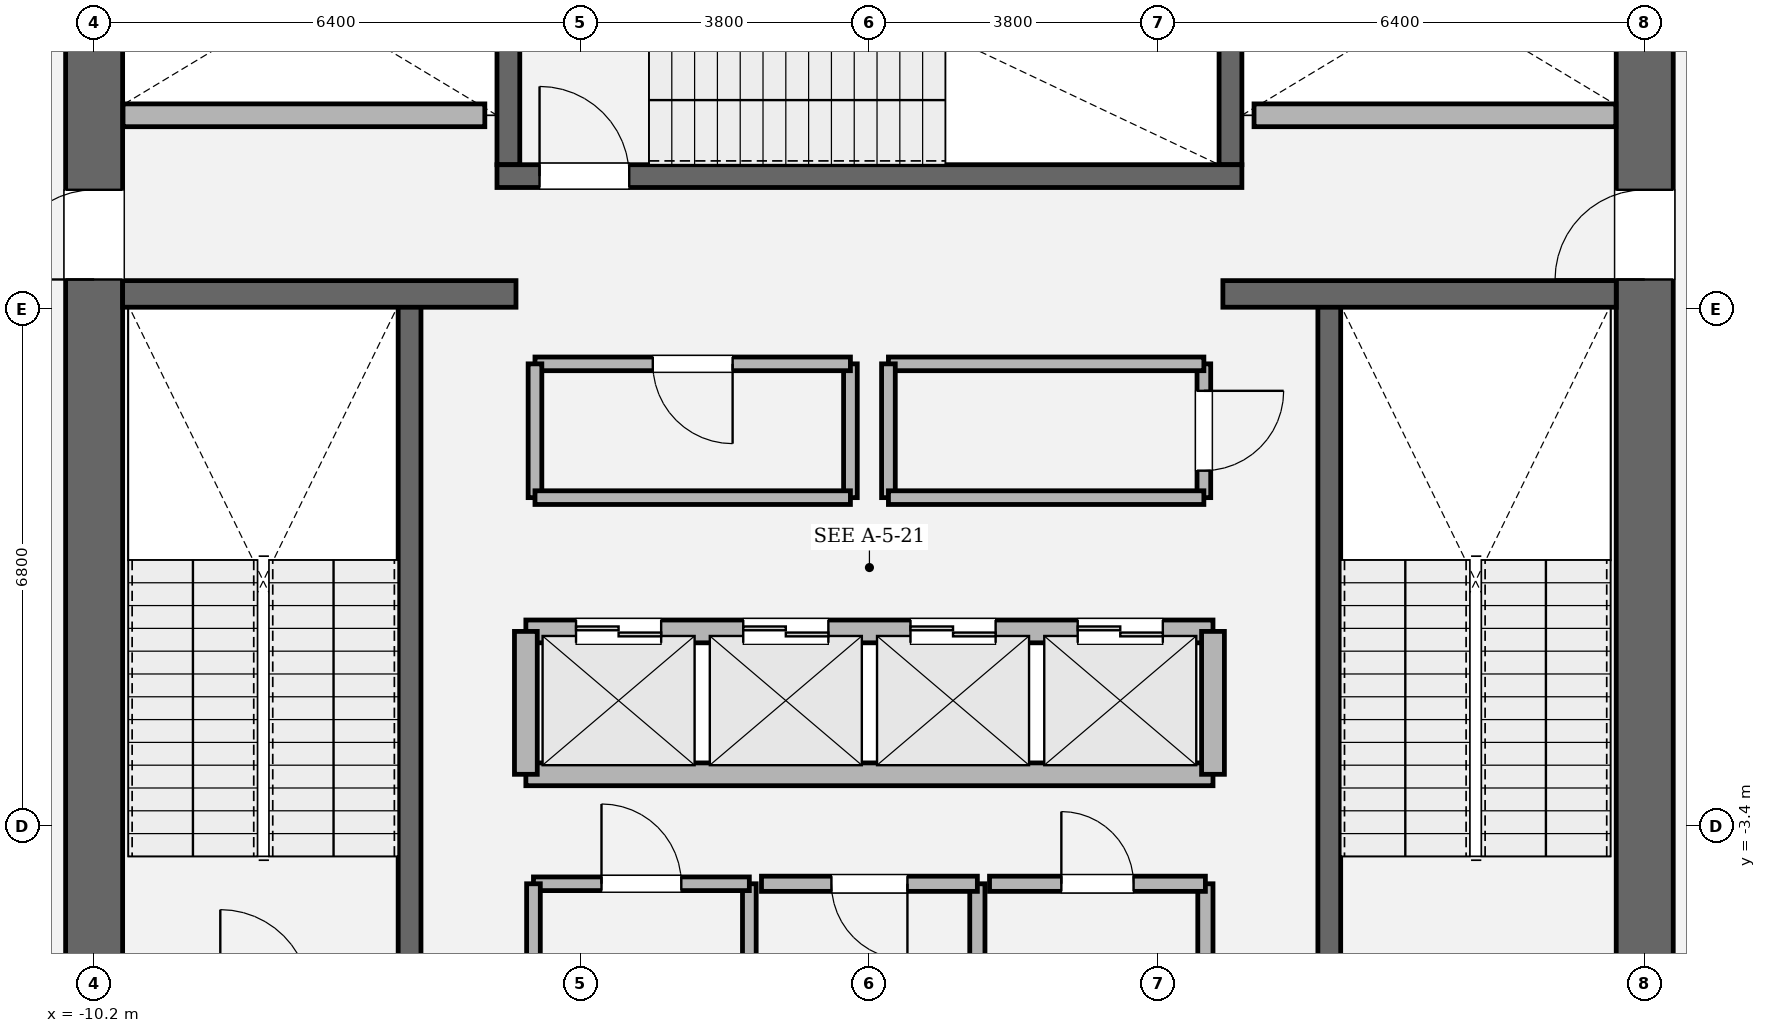
"""IFC4 building model, lengths in metres.
Left out: names, types, materials, properties, quantities, classifications, styles, units other than length and angle.
Written with IfcOpenShell. Run it as: python <this file> out.ifc"""

import sys

from ifc_helpers import new_model, si_unit, direction, frame, frame_2d, origin, place, context, subcontext, project, spatial, rectangle, extrude, element, fill, save


model = new_model("IFC4")
c1 = context("Model", 3, precision=1e-05, world=origin(), true_north=direction((0.0, 1.0)))
c2 = subcontext(c1, "Body", "Model", "MODEL_VIEW")
j1 = project(units=[si_unit("LENGTHUNIT", "METRE"), si_unit("PLANEANGLEUNIT", "RADIAN")], contexts=[c1])
p1 = place(None, origin())
s1 = spatial("IfcSite", under=j1, at=p1, CompositionType="ELEMENT")
p2 = place(p1, origin())
s2 = spatial("IfcBuilding", under=s1, at=p2, CompositionType="ELEMENT")
p3 = place(p2, frame((0.0, 0.0, 105.15)))
s3 = spatial("IfcBuildingStorey", under=s2, at=p3, CompositionType="ELEMENT", Elevation=105.15)
p4 = place(p3, frame((-10.2, -8.825, 0.0), z_axis=(0.0, 0.0, 1.0), x_axis=(0.0, 1.0, 0.0)))
e1 = element("IfcWall", 1, at=p4, inside=s3, PredefinedType="SHEAR", context=c2, shape_type="SweptSolid", body=[
    extrude(rectangle(XDim=17.65, YDim=0.75, at=frame_2d((8.825, 0.0))), origin(), (0.0, 0.0, 1.0), 4.05),
])
p5 = place(p4, frame((12.615, 0.0, 0.0)))
e2 = element("IfcOpeningElement", 2, at=p5, cuts=e1, PredefinedType="OPENING", context=c2, shape_type="SweptSolid", body=[
    extrude(rectangle(XDim=1.18, YDim=2.2, at=frame_2d((0.59, 1.1))), frame((0.0, 0.385, 0.0), z_axis=(0.0, -1.0, 0.0), x_axis=(1.0, 0.0, 0.0)), (0.0, 0.0, 1.0), 0.77),
])
p6 = place(p3, frame((10.2, 8.825, 0.0), z_axis=(0.0, 0.0, 1.0), x_axis=(0.0, -1.0, 0.0)))
e3 = element("IfcWall", 3, at=p6, inside=s3, PredefinedType="SHEAR", context=c2, shape_type="SweptSolid", body=[
    extrude(rectangle(XDim=17.65, YDim=0.75, at=frame_2d((8.825, 0.0))), origin(), (0.0, 0.0, 1.0), 4.05),
])
p7 = place(p6, frame((3.855, 0.0, 0.0)))
e4 = element("IfcOpeningElement", 4, at=p7, cuts=e3, PredefinedType="OPENING", context=c2, shape_type="SweptSolid", body=[
    extrude(rectangle(XDim=1.18, YDim=2.2, at=frame_2d((0.59, 1.1))), frame((0.0, 0.385, 0.0), z_axis=(0.0, -1.0, 0.0), x_axis=(1.0, 0.0, 0.0)), (0.0, 0.0, 1.0), 0.77),
])
for number, where, z_axis, x_axis in (
    (5, (-6.05, -5.5, 0.0), (0.0, 0.0, 1.0), (0.0, 1.0, 0.0)),
    (6, (6.05, 3.45, 0.0), (0.0, 0.0, 1.0), (0.0, -1.0, 0.0)),
):
    element("IfcWall", number, at=place(p3, frame(where, z_axis=z_axis, x_axis=x_axis)), inside=s3, PredefinedType="SOLIDWALL", context=c2, shape_type="SweptSolid", body=[
        extrude(rectangle(XDim=8.95, YDim=0.3, at=frame_2d((4.475, 0.0))), origin(), (0.0, 0.0, 1.0), 4.05),
    ])
for number, where, z_axis, x_axis in (
    (7, (-4.75, 5.3, 0.0), (0.0, 0.0, 1.0), (0.0, 1.0, 0.0)),
    (8, (4.75, 8.825, 0.0), (0.0, 0.0, 1.0), (0.0, -1.0, 0.0)),
):
    element("IfcWall", number, at=place(p3, frame(where, z_axis=z_axis, x_axis=x_axis)), inside=s3, PredefinedType="SOLIDWALL", context=c2, shape_type="SweptSolid", body=[
        extrude(rectangle(XDim=3.525, YDim=0.3, at=frame_2d((1.762, 0.0))), origin(), (0.0, 0.0, 1.0), 4.05),
    ])
p8 = place(p3, frame((-4.9, 5.15, 0.0), z_axis=(0.0, 0.0, 1.0), x_axis=(1.0, 0.0, 0.0)))
e9 = element("IfcWall", 9, at=p8, inside=s3, PredefinedType="SOLIDWALL", context=c2, shape_type="SweptSolid", body=[
    extrude(rectangle(XDim=9.8, YDim=0.3, at=frame_2d((4.9, 0.0))), origin(), (0.0, 0.0, 1.0), 4.05),
])
p9 = place(p8, frame((0.56, 0.0, 0.0)))
e10 = element("IfcOpeningElement", 10, at=p9, cuts=e9, PredefinedType="OPENING", context=c2, shape_type="SweptSolid", body=[
    extrude(rectangle(XDim=1.18, YDim=2.2, at=frame_2d((0.59, 1.1))), frame((0.0, 0.16, 0.0), z_axis=(0.0, -1.0, 0.0), x_axis=(1.0, 0.0, 0.0)), (0.0, 0.0, 1.0), 0.32),
])
for number, where, z_axis, x_axis in (
    (11, (-9.825, 3.6, 0.0), (0.0, 0.0, 1.0), (1.0, 0.0, 0.0)),
    (12, (4.65, 3.6, 0.0), (0.0, 0.0, 1.0), (1.0, 0.0, 0.0)),
):
    element("IfcWall", number, at=place(p3, frame(where, z_axis=z_axis, x_axis=x_axis)), inside=s3, PredefinedType="SOLIDWALL", context=c2, shape_type="SweptSolid", body=[
        extrude(rectangle(XDim=5.175, YDim=0.35, at=frame_2d((2.587, 0.0))), origin(), (0.0, 0.0, 1.0), 4.05),
    ])
p10 = place(p3, frame((-4.52, -0.84, 0.0), z_axis=(0.0, 0.0, 1.0), x_axis=(1.0, 0.0, 0.0)))
e13 = element("IfcWall", 13, at=p10, inside=s3, PredefinedType="SOLIDWALL", context=c2, shape_type="SweptSolid", body=[
    extrude(rectangle(XDim=9.04, YDim=0.3, at=frame_2d((4.52, 0.0))), origin(), (0.0, 0.0, 1.0), 3.81),
])
p11 = place(p10, frame((0.66, 0.0, 0.0)))
e14 = element("IfcOpeningElement", 14, at=p11, cuts=e13, PredefinedType="OPENING", context=c2, shape_type="SweptSolid", body=[
    extrude(rectangle(XDim=1.12, YDim=2.25, at=frame_2d((0.56, 1.125))), frame((0.0, 0.16, 0.0), z_axis=(0.0, -1.0, 0.0), x_axis=(1.0, 0.0, 0.0)), (0.0, 0.0, 1.0), 0.32),
])
p12 = place(p10, frame((2.86, 0.0, 0.0)))
e15 = element("IfcOpeningElement", 15, at=p12, cuts=e13, PredefinedType="OPENING", context=c2, shape_type="SweptSolid", body=[
    extrude(rectangle(XDim=1.12, YDim=2.25, at=frame_2d((0.56, 1.125))), frame((0.0, 0.16, 0.0), z_axis=(0.0, -1.0, 0.0), x_axis=(1.0, 0.0, 0.0)), (0.0, 0.0, 1.0), 0.32),
])
p13 = place(p10, frame((5.06, 0.0, 0.0)))
e16 = element("IfcOpeningElement", 16, at=p13, cuts=e13, PredefinedType="OPENING", context=c2, shape_type="SweptSolid", body=[
    extrude(rectangle(XDim=1.12, YDim=2.25, at=frame_2d((0.56, 1.125))), frame((0.0, 0.16, 0.0), z_axis=(0.0, -1.0, 0.0), x_axis=(1.0, 0.0, 0.0)), (0.0, 0.0, 1.0), 0.32),
])
p14 = place(p10, frame((7.26, 0.0, 0.0)))
e17 = element("IfcOpeningElement", 17, at=p14, cuts=e13, PredefinedType="OPENING", context=c2, shape_type="SweptSolid", body=[
    extrude(rectangle(XDim=1.12, YDim=2.25, at=frame_2d((0.56, 1.125))), frame((0.0, 0.16, 0.0), z_axis=(0.0, -1.0, 0.0), x_axis=(1.0, 0.0, 0.0)), (0.0, 0.0, 1.0), 0.32),
])
p15 = place(p3, frame((-4.52, -2.72, 0.0), z_axis=(0.0, 0.0, 1.0), x_axis=(1.0, 0.0, 0.0)))
e18 = element("IfcWall", 18, at=p15, inside=s3, PredefinedType="SOLIDWALL", context=c2, shape_type="SweptSolid", body=[
    extrude(rectangle(XDim=9.04, YDim=0.3, at=frame_2d((4.52, 0.0))), origin(), (0.0, 0.0, 1.0), 3.81),
])
for number, where, z_axis, x_axis in (
    (19, (-4.52, -2.72, 0.0), (0.0, 0.0, 1.0), (0.0, 1.0, 0.0)),
    (20, (4.52, -2.72, 0.0), (0.0, 0.0, 1.0), (0.0, 1.0, 0.0)),
):
    element("IfcWall", number, at=place(p3, frame(where, z_axis=z_axis, x_axis=x_axis)), inside=s3, PredefinedType="SOLIDWALL", context=c2, shape_type="SweptSolid", body=[
        extrude(rectangle(XDim=1.88, YDim=0.3, at=frame_2d((0.94, 0.0))), origin(), (0.0, 0.0, 1.0), 3.81),
    ])
for number, where, z_axis, x_axis in (
    (21, (-9.82, 5.95, 0.0), (0.0, 0.0, 1.0), (1.0, 0.0, 0.0)),
    (22, (5.06, 5.95, 0.0), (0.0, 0.0, 1.0), (1.0, 0.0, 0.0)),
):
    element("IfcWall", number, at=place(p3, frame(where, z_axis=z_axis, x_axis=x_axis)), inside=s3, PredefinedType="SOLIDWALL", context=c2, shape_type="SweptSolid", body=[
        extrude(rectangle(XDim=4.76, YDim=0.3, at=frame_2d((2.38, 0.0))), origin(), (0.0, 0.0, 1.0), 3.81),
    ])
p16 = place(p3, frame((-1.58, -5.9, 0.0), z_axis=(0.0, 0.0, 1.0), x_axis=(0.0, 1.0, 0.0)))
e23 = element("IfcWall", 23, at=p16, inside=s3, PredefinedType="PARTITIONING", context=c2, shape_type="SweptSolid", body=[
    extrude(rectangle(XDim=1.74, YDim=0.18, at=frame_2d((0.87, 0.0))), origin(), (0.0, 0.0, 1.0), 3.81),
])
p17 = place(p3, frame((-1.58, -4.16, 0.0), z_axis=(0.0, 0.0, 1.0), x_axis=(-1.0, 0.0, 0.0)))
e24 = element("IfcWall", 24, at=p17, inside=s3, PredefinedType="PARTITIONING", context=c2, shape_type="SweptSolid", body=[
    extrude(rectangle(XDim=2.84, YDim=0.18, at=frame_2d((1.42, 0.0))), origin(), (0.0, 0.0, 1.0), 3.81),
])
p18 = place(p17, frame((0.895, 0.0, 0.0)))
e25 = element("IfcOpeningElement", 25, at=p18, cuts=e24, PredefinedType="OPENING", context=c2, shape_type="SweptSolid", body=[
    extrude(rectangle(XDim=1.05, YDim=2.2, at=frame_2d((0.525, 1.1))), frame((0.0, 0.1, 0.0), z_axis=(0.0, -1.0, 0.0), x_axis=(1.0, 0.0, 0.0)), (0.0, 0.0, 1.0), 0.2),
])
p19 = place(p3, frame((-4.42, -4.16, 0.0), z_axis=(0.0, 0.0, 1.0), x_axis=(0.0, -1.0, 0.0)))
e26 = element("IfcWall", 26, at=p19, inside=s3, PredefinedType="PARTITIONING", context=c2, shape_type="SweptSolid", body=[
    extrude(rectangle(XDim=1.74, YDim=0.18, at=frame_2d((0.87, 0.0))), origin(), (0.0, 0.0, 1.0), 3.81),
])
p20 = place(p3, frame((1.42, -5.9, 0.0), z_axis=(0.0, 0.0, 1.0), x_axis=(0.0, 1.0, 0.0)))
e27 = element("IfcWall", 27, at=p20, inside=s3, PredefinedType="SOLIDWALL", context=c2, shape_type="SweptSolid", body=[
    extrude(rectangle(XDim=1.74, YDim=0.2, at=frame_2d((0.87, 0.0))), origin(), (0.0, 0.0, 1.0), 3.81),
])
p21 = place(p3, frame((1.42, -4.16, 0.0), z_axis=(0.0, 0.0, 1.0), x_axis=(-1.0, 0.0, 0.0)))
e28 = element("IfcWall", 28, at=p21, inside=s3, PredefinedType="SOLIDWALL", context=c2, shape_type="SweptSolid", body=[
    extrude(rectangle(XDim=2.84, YDim=0.2, at=frame_2d((1.42, 0.0))), origin(), (0.0, 0.0, 1.0), 3.81),
])
p22 = place(p21, frame((0.92, 0.0, 0.0)))
e29 = element("IfcOpeningElement", 29, at=p22, cuts=e28, PredefinedType="OPENING", context=c2, shape_type="SweptSolid", body=[
    extrude(rectangle(XDim=1.0, YDim=2.15, at=frame_2d((0.5, 1.075))), frame((0.0, 0.11, 0.0), z_axis=(0.0, -1.0, 0.0), x_axis=(1.0, 0.0, 0.0)), (0.0, 0.0, 1.0), 0.22),
])
p23 = place(p3, frame((4.42, -5.9, 0.0), z_axis=(0.0, 0.0, 1.0), x_axis=(0.0, 1.0, 0.0)))
e30 = element("IfcWall", 30, at=p23, inside=s3, PredefinedType="SOLIDWALL", context=c2, shape_type="SweptSolid", body=[
    extrude(rectangle(XDim=1.74, YDim=0.2, at=frame_2d((0.87, 0.0))), origin(), (0.0, 0.0, 1.0), 3.81),
])
p24 = place(p3, frame((4.42, -4.16, 0.0), z_axis=(0.0, 0.0, 1.0), x_axis=(-1.0, 0.0, 0.0)))
e31 = element("IfcWall", 31, at=p24, inside=s3, PredefinedType="SOLIDWALL", context=c2, shape_type="SweptSolid", body=[
    extrude(rectangle(XDim=2.84, YDim=0.2, at=frame_2d((1.42, 0.0))), origin(), (0.0, 0.0, 1.0), 3.81),
])
p25 = place(p24, frame((0.945, 0.0, 0.0)))
e32 = element("IfcOpeningElement", 32, at=p25, cuts=e31, PredefinedType="OPENING", context=c2, shape_type="SweptSolid", body=[
    extrude(rectangle(XDim=0.95, YDim=2.15, at=frame_2d((0.475, 1.075))), frame((0.0, 0.11, 0.0), z_axis=(0.0, -1.0, 0.0), x_axis=(1.0, 0.0, 0.0)), (0.0, 0.0, 1.0), 0.22),
])
p26 = place(p3, frame((-0.25, 0.92, 0.0), z_axis=(0.0, 0.0, 1.0), x_axis=(0.0, 1.0, 0.0)))
e33 = element("IfcWall", 33, at=p26, inside=s3, PredefinedType="PARTITIONING", context=c2, shape_type="SweptSolid", body=[
    extrude(rectangle(XDim=1.76, YDim=0.18, at=frame_2d((0.88, 0.0))), origin(), (0.0, 0.0, 1.0), 3.81),
])
p27 = place(p3, frame((-0.25, 2.68, 0.0), z_axis=(0.0, 0.0, 1.0), x_axis=(-1.0, 0.0, 0.0)))
e34 = element("IfcWall", 34, at=p27, inside=s3, PredefinedType="PARTITIONING", context=c2, shape_type="SweptSolid", body=[
    extrude(rectangle(XDim=4.15, YDim=0.18, at=frame_2d((2.075, 0.0))), origin(), (0.0, 0.0, 1.0), 3.81),
])
p28 = place(p27, frame((1.55, 0.0, 0.0)))
e35 = element("IfcOpeningElement", 35, at=p28, cuts=e34, PredefinedType="OPENING", context=c2, shape_type="SweptSolid", body=[
    extrude(rectangle(XDim=1.05, YDim=2.2, at=frame_2d((0.525, 1.1))), frame((0.0, 0.1, 0.0), z_axis=(0.0, -1.0, 0.0), x_axis=(1.0, 0.0, 0.0)), (0.0, 0.0, 1.0), 0.2),
])
p29 = place(p3, frame((-4.4, 2.68, 0.0), z_axis=(0.0, 0.0, 1.0), x_axis=(0.0, -1.0, 0.0)))
e36 = element("IfcWall", 36, at=p29, inside=s3, PredefinedType="PARTITIONING", context=c2, shape_type="SweptSolid", body=[
    extrude(rectangle(XDim=1.76, YDim=0.18, at=frame_2d((0.88, 0.0))), origin(), (0.0, 0.0, 1.0), 3.81),
])
p30 = place(p3, frame((-4.4, 0.92, 0.0), z_axis=(0.0, 0.0, 1.0), x_axis=(1.0, 0.0, 0.0)))
e37 = element("IfcWall", 37, at=p30, inside=s3, PredefinedType="PARTITIONING", context=c2, shape_type="SweptSolid", body=[
    extrude(rectangle(XDim=4.15, YDim=0.18, at=frame_2d((2.075, 0.0))), origin(), (0.0, 0.0, 1.0), 3.81),
])
p31 = place(p3, frame((4.4, 0.92, 0.0), z_axis=(0.0, 0.0, 1.0), x_axis=(0.0, 1.0, 0.0)))
e38 = element("IfcWall", 38, at=p31, inside=s3, PredefinedType="PARTITIONING", context=c2, shape_type="SweptSolid", body=[
    extrude(rectangle(XDim=1.76, YDim=0.18, at=frame_2d((0.88, 0.0))), origin(), (0.0, 0.0, 1.0), 3.81),
])
p32 = place(p31, frame((0.355, 0.0, 0.0)))
e39 = element("IfcOpeningElement", 39, at=p32, cuts=e38, PredefinedType="OPENING", context=c2, shape_type="SweptSolid", body=[
    extrude(rectangle(XDim=1.05, YDim=2.2, at=frame_2d((0.525, 1.1))), frame((0.0, 0.1, 0.0), z_axis=(0.0, -1.0, 0.0), x_axis=(1.0, 0.0, 0.0)), (0.0, 0.0, 1.0), 0.2),
])
p33 = place(p3, frame((4.4, 2.68, 0.0), z_axis=(0.0, 0.0, 1.0), x_axis=(-1.0, 0.0, 0.0)))
e40 = element("IfcWall", 40, at=p33, inside=s3, PredefinedType="PARTITIONING", context=c2, shape_type="SweptSolid", body=[
    extrude(rectangle(XDim=4.15, YDim=0.18, at=frame_2d((2.075, 0.0))), origin(), (0.0, 0.0, 1.0), 3.81),
])
p34 = place(p3, frame((0.25, 2.68, 0.0), z_axis=(0.0, 0.0, 1.0), x_axis=(0.0, -1.0, 0.0)))
e41 = element("IfcWall", 41, at=p34, inside=s3, PredefinedType="PARTITIONING", context=c2, shape_type="SweptSolid", body=[
    extrude(rectangle(XDim=1.76, YDim=0.18, at=frame_2d((0.88, 0.0))), origin(), (0.0, 0.0, 1.0), 3.81),
])
p35 = place(p3, frame((0.25, 0.92, 0.0), z_axis=(0.0, 0.0, 1.0), x_axis=(1.0, 0.0, 0.0)))
e42 = element("IfcWall", 42, at=p35, inside=s3, PredefinedType="PARTITIONING", context=c2, shape_type="SweptSolid", body=[
    extrude(rectangle(XDim=4.15, YDim=0.18, at=frame_2d((2.075, 0.0))), origin(), (0.0, 0.0, 1.0), 3.81),
])
p36 = place(p9, origin())
e43 = element("IfcDoor", 43, at=p36, inside=s3, OperationType="SINGLE_SWING_LEFT", PredefinedType="DOOR", context=c2, shape_type="SweptSolid", body=[
    extrude(rectangle(XDim=1.18, YDim=2.2, at=frame_2d((0.59, 1.1))), frame((0.0, 0.025, 0.0), z_axis=(0.0, -1.0, 0.0), x_axis=(1.0, 0.0, 0.0)), (0.0, 0.0, 1.0), 0.05),
])
fill(e10, e43)
p37 = place(p5, origin())
e44 = element("IfcDoor", 44, at=p37, inside=s3, OperationType="SINGLE_SWING_LEFT", PredefinedType="DOOR", context=c2, shape_type="SweptSolid", body=[
    extrude(rectangle(XDim=1.18, YDim=2.2, at=frame_2d((0.59, 1.1))), frame((0.0, 0.025, 0.0), z_axis=(0.0, -1.0, 0.0), x_axis=(1.0, 0.0, 0.0)), (0.0, 0.0, 1.0), 0.05),
])
fill(e2, e44)
p38 = place(p7, origin())
e45 = element("IfcDoor", 45, at=p38, inside=s3, OperationType="SINGLE_SWING_RIGHT", PredefinedType="DOOR", context=c2, shape_type="SweptSolid", body=[
    extrude(rectangle(XDim=1.18, YDim=2.2, at=frame_2d((0.59, 1.1))), frame((0.0, 0.025, 0.0), z_axis=(0.0, -1.0, 0.0), x_axis=(1.0, 0.0, 0.0)), (0.0, 0.0, 1.0), 0.05),
])
fill(e4, e45)
p39 = place(p11, origin())
e46 = element("IfcDoor", 46, at=p39, inside=s3, OperationType="DOUBLE_DOOR_SLIDING", PredefinedType="DOOR", context=c2, shape_type="SweptSolid", body=[
    extrude(rectangle(XDim=1.12, YDim=2.25, at=frame_2d((0.56, 1.125))), frame((0.0, 0.025, 0.0), z_axis=(0.0, -1.0, 0.0), x_axis=(1.0, 0.0, 0.0)), (0.0, 0.0, 1.0), 0.05),
])
fill(e14, e46)
p40 = place(p12, origin())
e47 = element("IfcDoor", 47, at=p40, inside=s3, OperationType="DOUBLE_DOOR_SLIDING", PredefinedType="DOOR", context=c2, shape_type="SweptSolid", body=[
    extrude(rectangle(XDim=1.12, YDim=2.25, at=frame_2d((0.56, 1.125))), frame((0.0, 0.025, 0.0), z_axis=(0.0, -1.0, 0.0), x_axis=(1.0, 0.0, 0.0)), (0.0, 0.0, 1.0), 0.05),
])
fill(e15, e47)
p41 = place(p13, origin())
e48 = element("IfcDoor", 48, at=p41, inside=s3, OperationType="DOUBLE_DOOR_SLIDING", PredefinedType="DOOR", context=c2, shape_type="SweptSolid", body=[
    extrude(rectangle(XDim=1.12, YDim=2.25, at=frame_2d((0.56, 1.125))), frame((0.0, 0.025, 0.0), z_axis=(0.0, -1.0, 0.0), x_axis=(1.0, 0.0, 0.0)), (0.0, 0.0, 1.0), 0.05),
])
fill(e16, e48)
p42 = place(p14, origin())
e49 = element("IfcDoor", 49, at=p42, inside=s3, OperationType="DOUBLE_DOOR_SLIDING", PredefinedType="DOOR", context=c2, shape_type="SweptSolid", body=[
    extrude(rectangle(XDim=1.12, YDim=2.25, at=frame_2d((0.56, 1.125))), frame((0.0, 0.025, 0.0), z_axis=(0.0, -1.0, 0.0), x_axis=(1.0, 0.0, 0.0)), (0.0, 0.0, 1.0), 0.05),
])
fill(e17, e49)
p43 = place(p18, origin())
e50 = element("IfcDoor", 50, at=p43, inside=s3, OperationType="SINGLE_SWING_RIGHT", PredefinedType="DOOR", context=c2, shape_type="SweptSolid", body=[
    extrude(rectangle(XDim=1.05, YDim=2.2, at=frame_2d((0.525, 1.1))), frame((0.0, 0.025, 0.0), z_axis=(0.0, -1.0, 0.0), x_axis=(1.0, 0.0, 0.0)), (0.0, 0.0, 1.0), 0.05),
])
fill(e25, e50)
p44 = place(p22, origin())
e51 = element("IfcDoor", 51, at=p44, inside=s3, OperationType="SINGLE_SWING_LEFT", PredefinedType="DOOR", context=c2, shape_type="SweptSolid", body=[
    extrude(rectangle(XDim=1.0, YDim=2.15, at=frame_2d((0.5, 1.075))), frame((0.0, 0.025, 0.0), z_axis=(0.0, -1.0, 0.0), x_axis=(1.0, 0.0, 0.0)), (0.0, 0.0, 1.0), 0.05),
])
fill(e29, e51)
p45 = place(p25, origin())
e52 = element("IfcDoor", 52, at=p45, inside=s3, OperationType="SINGLE_SWING_RIGHT", PredefinedType="DOOR", context=c2, shape_type="SweptSolid", body=[
    extrude(rectangle(XDim=0.95, YDim=2.15, at=frame_2d((0.475, 1.075))), frame((0.0, 0.025, 0.0), z_axis=(0.0, -1.0, 0.0), x_axis=(1.0, 0.0, 0.0)), (0.0, 0.0, 1.0), 0.05),
])
fill(e32, e52)
p46 = place(p28, origin())
e53 = element("IfcDoor", 53, at=p46, inside=s3, OperationType="SINGLE_SWING_LEFT", PredefinedType="DOOR", context=c2, shape_type="SweptSolid", body=[
    extrude(rectangle(XDim=1.05, YDim=2.2, at=frame_2d((0.525, 1.1))), frame((0.0, 0.025, 0.0), z_axis=(0.0, -1.0, 0.0), x_axis=(1.0, 0.0, 0.0)), (0.0, 0.0, 1.0), 0.05),
])
fill(e35, e53)
p47 = place(p32, origin())
e54 = element("IfcDoor", 54, at=p47, inside=s3, OperationType="SINGLE_SWING_RIGHT", PredefinedType="DOOR", context=c2, shape_type="SweptSolid", body=[
    extrude(rectangle(XDim=1.05, YDim=2.2, at=frame_2d((0.525, 1.1))), frame((0.0, 0.025, 0.0), z_axis=(0.0, -1.0, 0.0), x_axis=(1.0, 0.0, 0.0)), (0.0, 0.0, 1.0), 0.05),
])
fill(e39, e54)
save(model, sys.argv[1])
